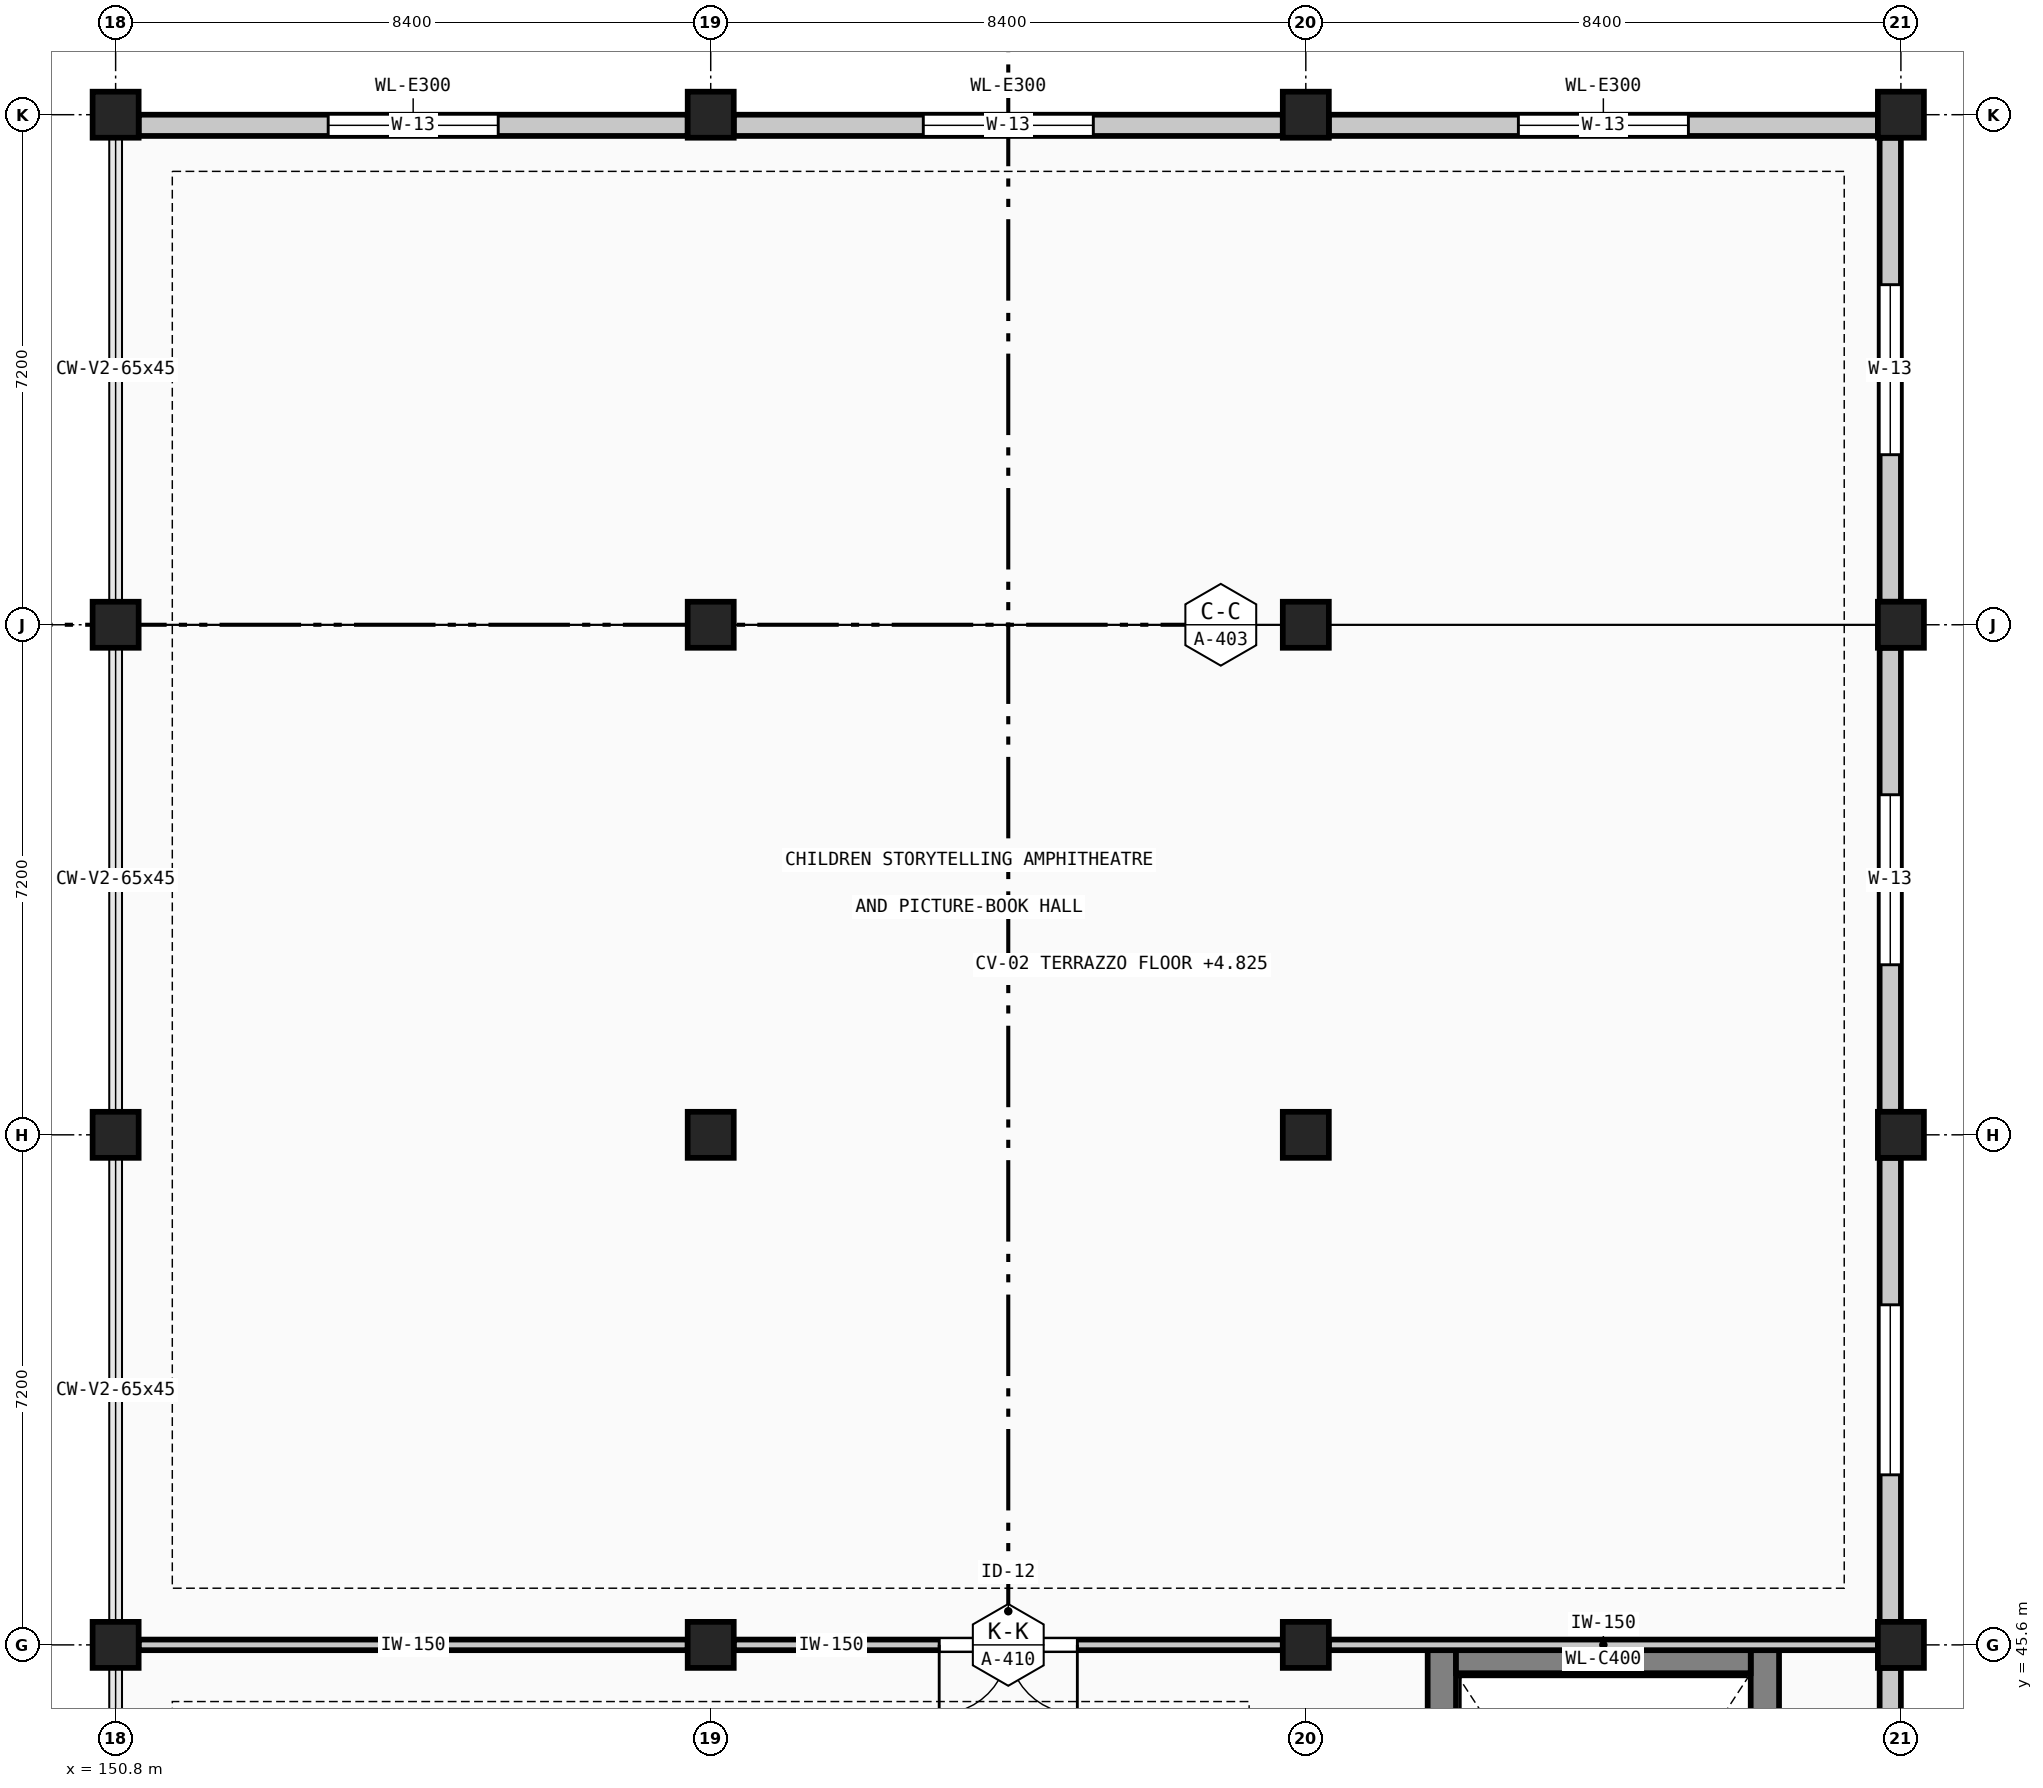
"""IFC4 building model, lengths in metres.
Left out: names, types, materials, properties, quantities, classifications, styles, units other than length and angle.
Written with IfcOpenShell. Run it as: python <this file> out.ifc"""

import sys

from ifc_helpers import new_model, si_unit, direction, frame, frame_2d, origin, origin_2d, place, context, subcontext, project, spatial, rectangle, extrude, element, fill, save


model = new_model("IFC4")
c1 = context("Model", 3, precision=1e-05, world=origin(), true_north=direction((0.0, 1.0)))
c2 = subcontext(c1, "Body", "Model", "MODEL_VIEW")
j1 = project(units=[si_unit("LENGTHUNIT", "METRE"), si_unit("PLANEANGLEUNIT", "RADIAN")], contexts=[c1])
p1 = place(None, origin())
s1 = spatial("IfcSite", under=j1, at=p1, CompositionType="ELEMENT")
p2 = place(p1, origin())
s2 = spatial("IfcBuilding", under=s1, at=p2, CompositionType="ELEMENT")
p3 = place(p2, frame((0.0, 0.0, 4.8)))
s3 = spatial("IfcBuildingStorey", under=s2, at=p3, CompositionType="ELEMENT", Elevation=4.8)
for number, where, z_axis, x_axis in (
    (1, (150.8, 45.6, 0.0), (0.0, 0.0, 1.0), (1.0, 0.0, 0.0)),
    (2, (150.8, 52.8, 0.0), (0.0, 0.0, 1.0), (1.0, 0.0, 0.0)),
    (3, (150.8, 60.0, 0.0), (0.0, 0.0, 1.0), (1.0, 0.0, 0.0)),
    (4, (150.8, 67.2, 0.0), (0.0, 0.0, 1.0), (1.0, 0.0, 0.0)),
    (5, (159.2, 45.6, 0.0), (0.0, 0.0, 1.0), (1.0, 0.0, 0.0)),
    (6, (159.2, 52.8, 0.0), (0.0, 0.0, 1.0), (1.0, 0.0, 0.0)),
    (7, (159.2, 60.0, 0.0), (0.0, 0.0, 1.0), (1.0, 0.0, 0.0)),
    (8, (159.2, 67.2, 0.0), (0.0, 0.0, 1.0), (1.0, 0.0, 0.0)),
    (9, (167.6, 45.6, 0.0), (0.0, 0.0, 1.0), (1.0, 0.0, 0.0)),
    (10, (167.6, 52.8, 0.0), (0.0, 0.0, 1.0), (1.0, 0.0, 0.0)),
    (11, (167.6, 60.0, 0.0), (0.0, 0.0, 1.0), (1.0, 0.0, 0.0)),
    (12, (167.6, 67.2, 0.0), (0.0, 0.0, 1.0), (1.0, 0.0, 0.0)),
    (13, (176.0, 45.6, 0.0), (0.0, 0.0, 1.0), (1.0, 0.0, 0.0)),
    (14, (176.0, 52.8, 0.0), (0.0, 0.0, 1.0), (1.0, 0.0, 0.0)),
    (15, (176.0, 60.0, 0.0), (0.0, 0.0, 1.0), (1.0, 0.0, 0.0)),
    (16, (176.0, 67.2, 0.0), (0.0, 0.0, 1.0), (1.0, 0.0, 0.0)),
):
    element("IfcColumn", number, at=place(p3, frame(where, z_axis=z_axis, x_axis=x_axis)), inside=s3, PredefinedType="COLUMN", context=c2, shape_type="SweptSolid", body=[
        extrude(rectangle(XDim=0.65, YDim=0.65, at=origin_2d()), origin(), (0.0, 0.0, 1.0), 4.8),
    ])
for number, where, z_axis, x_axis in (
    (17, (169.52, 36.4, 0.0), (0.0, 0.0, 1.0), (0.0, 1.0, 0.0)),
    (18, (174.08, 45.6, 0.0), (0.0, 0.0, 1.0), (0.0, -1.0, 0.0)),
):
    element("IfcWall", number, at=place(p3, frame(where, z_axis=z_axis, x_axis=x_axis)), inside=s3, PredefinedType="SHEAR", context=c2, shape_type="SweptSolid", body=[
        extrude(rectangle(XDim=9.2, YDim=0.4, at=frame_2d((4.6, 0.0))), origin(), (0.0, 0.0, 1.0), 4.575),
    ])
p4 = place(p3, frame((169.72, 45.4, 0.0), z_axis=(0.0, 0.0, 1.0), x_axis=(1.0, 0.0, 0.0)))
e19 = element("IfcWall", 19, at=p4, inside=s3, PredefinedType="SHEAR", context=c2, shape_type="SweptSolid", body=[
    extrude(rectangle(XDim=4.16, YDim=0.4, at=frame_2d((2.08, 0.0))), origin(), (0.0, 0.0, 1.0), 4.575),
])
p5 = place(p3, frame((151.125, 67.05, 0.0), z_axis=(0.0, 0.0, 1.0), x_axis=(1.0, 0.0, 0.0)))
e20 = element("IfcWall", 20, at=p5, inside=s3, PredefinedType="SOLIDWALL", context=c2, shape_type="SweptSolid", body=[
    extrude(rectangle(XDim=7.75, YDim=0.3, at=frame_2d((3.875, 0.0))), origin(), (0.0, 0.0, 1.0), 4.5),
])
p6 = place(p5, frame((2.675, 0.0, 0.75)))
e21 = element("IfcOpeningElement", 21, at=p6, cuts=e20, PredefinedType="OPENING", context=c2, shape_type="SweptSolid", body=[
    extrude(rectangle(XDim=2.4, YDim=2.4, at=frame_2d((1.2, 1.2))), frame((0.0, 0.16, 0.0), z_axis=(0.0, -1.0, 0.0), x_axis=(1.0, 0.0, 0.0)), (0.0, 0.0, 1.0), 0.32),
])
p7 = place(p3, frame((159.525, 67.05, 0.0), z_axis=(0.0, 0.0, 1.0), x_axis=(1.0, 0.0, 0.0)))
e22 = element("IfcWall", 22, at=p7, inside=s3, PredefinedType="SOLIDWALL", context=c2, shape_type="SweptSolid", body=[
    extrude(rectangle(XDim=7.75, YDim=0.3, at=frame_2d((3.875, 0.0))), origin(), (0.0, 0.0, 1.0), 4.5),
])
p8 = place(p7, frame((2.675, 0.0, 0.75)))
e23 = element("IfcOpeningElement", 23, at=p8, cuts=e22, PredefinedType="OPENING", context=c2, shape_type="SweptSolid", body=[
    extrude(rectangle(XDim=2.4, YDim=2.4, at=frame_2d((1.2, 1.2))), frame((0.0, 0.16, 0.0), z_axis=(0.0, -1.0, 0.0), x_axis=(1.0, 0.0, 0.0)), (0.0, 0.0, 1.0), 0.32),
])
p9 = place(p3, frame((167.925, 67.05, 0.0), z_axis=(0.0, 0.0, 1.0), x_axis=(1.0, 0.0, 0.0)))
e24 = element("IfcWall", 24, at=p9, inside=s3, PredefinedType="SOLIDWALL", context=c2, shape_type="SweptSolid", body=[
    extrude(rectangle(XDim=7.75, YDim=0.3, at=frame_2d((3.875, 0.0))), origin(), (0.0, 0.0, 1.0), 4.5),
])
p10 = place(p9, frame((2.675, 0.0, 0.75)))
e25 = element("IfcOpeningElement", 25, at=p10, cuts=e24, PredefinedType="OPENING", context=c2, shape_type="SweptSolid", body=[
    extrude(rectangle(XDim=2.4, YDim=2.4, at=frame_2d((1.2, 1.2))), frame((0.0, 0.16, 0.0), z_axis=(0.0, -1.0, 0.0), x_axis=(1.0, 0.0, 0.0)), (0.0, 0.0, 1.0), 0.32),
])
p11 = place(p3, frame((175.85, 66.875, 0.0), z_axis=(0.0, 0.0, 1.0), x_axis=(0.0, -1.0, 0.0)))
e26 = element("IfcWall", 26, at=p11, inside=s3, PredefinedType="SOLIDWALL", context=c2, shape_type="SweptSolid", body=[
    extrude(rectangle(XDim=6.55, YDim=0.3, at=frame_2d((3.275, 0.0))), origin(), (0.0, 0.0, 1.0), 4.5),
])
p12 = place(p11, frame((2.075, 0.0, 0.75)))
e27 = element("IfcOpeningElement", 27, at=p12, cuts=e26, PredefinedType="OPENING", context=c2, shape_type="SweptSolid", body=[
    extrude(rectangle(XDim=2.4, YDim=2.4, at=frame_2d((1.2, 1.2))), frame((0.0, 0.16, 0.0), z_axis=(0.0, -1.0, 0.0), x_axis=(1.0, 0.0, 0.0)), (0.0, 0.0, 1.0), 0.32),
])
p13 = place(p3, frame((175.85, 59.675, 0.0), z_axis=(0.0, 0.0, 1.0), x_axis=(0.0, -1.0, 0.0)))
e28 = element("IfcWall", 28, at=p13, inside=s3, PredefinedType="SOLIDWALL", context=c2, shape_type="SweptSolid", body=[
    extrude(rectangle(XDim=6.55, YDim=0.3, at=frame_2d((3.275, 0.0))), origin(), (0.0, 0.0, 1.0), 4.5),
])
p14 = place(p13, frame((2.075, 0.0, 0.75)))
e29 = element("IfcOpeningElement", 29, at=p14, cuts=e28, PredefinedType="OPENING", context=c2, shape_type="SweptSolid", body=[
    extrude(rectangle(XDim=2.4, YDim=2.4, at=frame_2d((1.2, 1.2))), frame((0.0, 0.16, 0.0), z_axis=(0.0, -1.0, 0.0), x_axis=(1.0, 0.0, 0.0)), (0.0, 0.0, 1.0), 0.32),
])
p15 = place(p3, frame((175.85, 52.475, 0.0), z_axis=(0.0, 0.0, 1.0), x_axis=(0.0, -1.0, 0.0)))
e30 = element("IfcWall", 30, at=p15, inside=s3, PredefinedType="SOLIDWALL", context=c2, shape_type="SweptSolid", body=[
    extrude(rectangle(XDim=6.55, YDim=0.3, at=frame_2d((3.275, 0.0))), origin(), (0.0, 0.0, 1.0), 4.5),
])
p16 = place(p15, frame((2.075, 0.0, 0.75)))
e31 = element("IfcOpeningElement", 31, at=p16, cuts=e30, PredefinedType="OPENING", context=c2, shape_type="SweptSolid", body=[
    extrude(rectangle(XDim=2.4, YDim=2.4, at=frame_2d((1.2, 1.2))), frame((0.0, 0.16, 0.0), z_axis=(0.0, -1.0, 0.0), x_axis=(1.0, 0.0, 0.0)), (0.0, 0.0, 1.0), 0.32),
])
p17 = place(p3, frame((175.85, 45.275, 0.0), z_axis=(0.0, 0.0, 1.0), x_axis=(0.0, -1.0, 0.0)))
e32 = element("IfcWall", 32, at=p17, inside=s3, PredefinedType="SOLIDWALL", context=c2, shape_type="SweptSolid", body=[
    extrude(rectangle(XDim=6.55, YDim=0.3, at=frame_2d((3.275, 0.0))), origin(), (0.0, 0.0, 1.0), 4.5),
])
p18 = place(p17, frame((2.075, 0.0, 0.75)))
e33 = element("IfcOpeningElement", 33, at=p18, cuts=e32, PredefinedType="OPENING", context=c2, shape_type="SweptSolid", body=[
    extrude(rectangle(XDim=2.4, YDim=2.4, at=frame_2d((1.2, 1.2))), frame((0.0, 0.16, 0.0), z_axis=(0.0, -1.0, 0.0), x_axis=(1.0, 0.0, 0.0)), (0.0, 0.0, 1.0), 0.32),
])
p19 = place(p3, frame((175.675, 45.6, 0.0), z_axis=(0.0, 0.0, 1.0), x_axis=(-1.0, 0.0, 0.0)))
e34 = element("IfcWall", 34, at=p19, inside=s3, PredefinedType="PARTITIONING", context=c2, shape_type="SweptSolid", body=[
    extrude(rectangle(XDim=7.75, YDim=0.15, at=frame_2d((3.875, 0.0))), origin(), (0.0, 0.0, 1.0), 4.5),
])
p20 = place(p3, frame((167.275, 45.6, 0.0), z_axis=(0.0, 0.0, 1.0), x_axis=(-1.0, 0.0, 0.0)))
e35 = element("IfcWall", 35, at=p20, inside=s3, PredefinedType="PARTITIONING", context=c2, shape_type="SweptSolid", body=[
    extrude(rectangle(XDim=7.75, YDim=0.15, at=frame_2d((3.875, 0.0))), origin(), (0.0, 0.0, 1.0), 4.5),
])
p21 = place(p20, frame((2.9, 0.0, 0.0)))
e36 = element("IfcOpeningElement", 36, at=p21, cuts=e35, PredefinedType="OPENING", context=c2, shape_type="SweptSolid", body=[
    extrude(rectangle(XDim=1.95, YDim=2.35, at=frame_2d((0.975, 1.175))), frame((0.0, 0.085, 0.0), z_axis=(0.0, -1.0, 0.0), x_axis=(1.0, 0.0, 0.0)), (0.0, 0.0, 1.0), 0.17),
])
p22 = place(p3, frame((158.875, 45.6, 0.0), z_axis=(0.0, 0.0, 1.0), x_axis=(-1.0, 0.0, 0.0)))
e37 = element("IfcWall", 37, at=p22, inside=s3, PredefinedType="PARTITIONING", context=c2, shape_type="SweptSolid", body=[
    extrude(rectangle(XDim=7.75, YDim=0.15, at=frame_2d((3.875, 0.0))), origin(), (0.0, 0.0, 1.0), 4.5),
])
p23 = place(p6, origin())
e38 = element("IfcWindow", 38, at=p23, inside=s3, PartitioningType="SINGLE_PANEL", PredefinedType="WINDOW", context=c2, shape_type="SweptSolid", body=[
    extrude(rectangle(XDim=2.4, YDim=2.4, at=frame_2d((1.2, 1.2))), frame((0.0, 0.03, 0.0), z_axis=(0.0, -1.0, 0.0), x_axis=(1.0, 0.0, 0.0)), (0.0, 0.0, 1.0), 0.06),
])
fill(e21, e38)
p24 = place(p8, origin())
e39 = element("IfcWindow", 39, at=p24, inside=s3, PartitioningType="SINGLE_PANEL", PredefinedType="WINDOW", context=c2, shape_type="SweptSolid", body=[
    extrude(rectangle(XDim=2.4, YDim=2.4, at=frame_2d((1.2, 1.2))), frame((0.0, 0.03, 0.0), z_axis=(0.0, -1.0, 0.0), x_axis=(1.0, 0.0, 0.0)), (0.0, 0.0, 1.0), 0.06),
])
fill(e23, e39)
p25 = place(p10, origin())
e40 = element("IfcWindow", 40, at=p25, inside=s3, PartitioningType="SINGLE_PANEL", PredefinedType="WINDOW", context=c2, shape_type="SweptSolid", body=[
    extrude(rectangle(XDim=2.4, YDim=2.4, at=frame_2d((1.2, 1.2))), frame((0.0, 0.03, 0.0), z_axis=(0.0, -1.0, 0.0), x_axis=(1.0, 0.0, 0.0)), (0.0, 0.0, 1.0), 0.06),
])
fill(e25, e40)
p26 = place(p12, origin())
e41 = element("IfcWindow", 41, at=p26, inside=s3, PartitioningType="SINGLE_PANEL", PredefinedType="WINDOW", context=c2, shape_type="SweptSolid", body=[
    extrude(rectangle(XDim=2.4, YDim=2.4, at=frame_2d((1.2, 1.2))), frame((0.0, 0.03, 0.0), z_axis=(0.0, -1.0, 0.0), x_axis=(1.0, 0.0, 0.0)), (0.0, 0.0, 1.0), 0.06),
])
fill(e27, e41)
p27 = place(p14, origin())
e42 = element("IfcWindow", 42, at=p27, inside=s3, PartitioningType="SINGLE_PANEL", PredefinedType="WINDOW", context=c2, shape_type="SweptSolid", body=[
    extrude(rectangle(XDim=2.4, YDim=2.4, at=frame_2d((1.2, 1.2))), frame((0.0, 0.03, 0.0), z_axis=(0.0, -1.0, 0.0), x_axis=(1.0, 0.0, 0.0)), (0.0, 0.0, 1.0), 0.06),
])
fill(e29, e42)
p28 = place(p16, origin())
e43 = element("IfcWindow", 43, at=p28, inside=s3, PartitioningType="SINGLE_PANEL", PredefinedType="WINDOW", context=c2, shape_type="SweptSolid", body=[
    extrude(rectangle(XDim=2.4, YDim=2.4, at=frame_2d((1.2, 1.2))), frame((0.0, 0.03, 0.0), z_axis=(0.0, -1.0, 0.0), x_axis=(1.0, 0.0, 0.0)), (0.0, 0.0, 1.0), 0.06),
])
fill(e31, e43)
p29 = place(p21, origin())
e44 = element("IfcDoor", 44, at=p29, inside=s3, OperationType="DOUBLE_DOOR_SINGLE_SWING", PredefinedType="DOOR", context=c2, shape_type="SweptSolid", body=[
    extrude(rectangle(XDim=1.95, YDim=2.35, at=frame_2d((0.975, 1.175))), frame((0.0, 0.025, 0.0), z_axis=(0.0, -1.0, 0.0), x_axis=(1.0, 0.0, 0.0)), (0.0, 0.0, 1.0), 0.05),
])
fill(e36, e44)
save(model, sys.argv[1])
